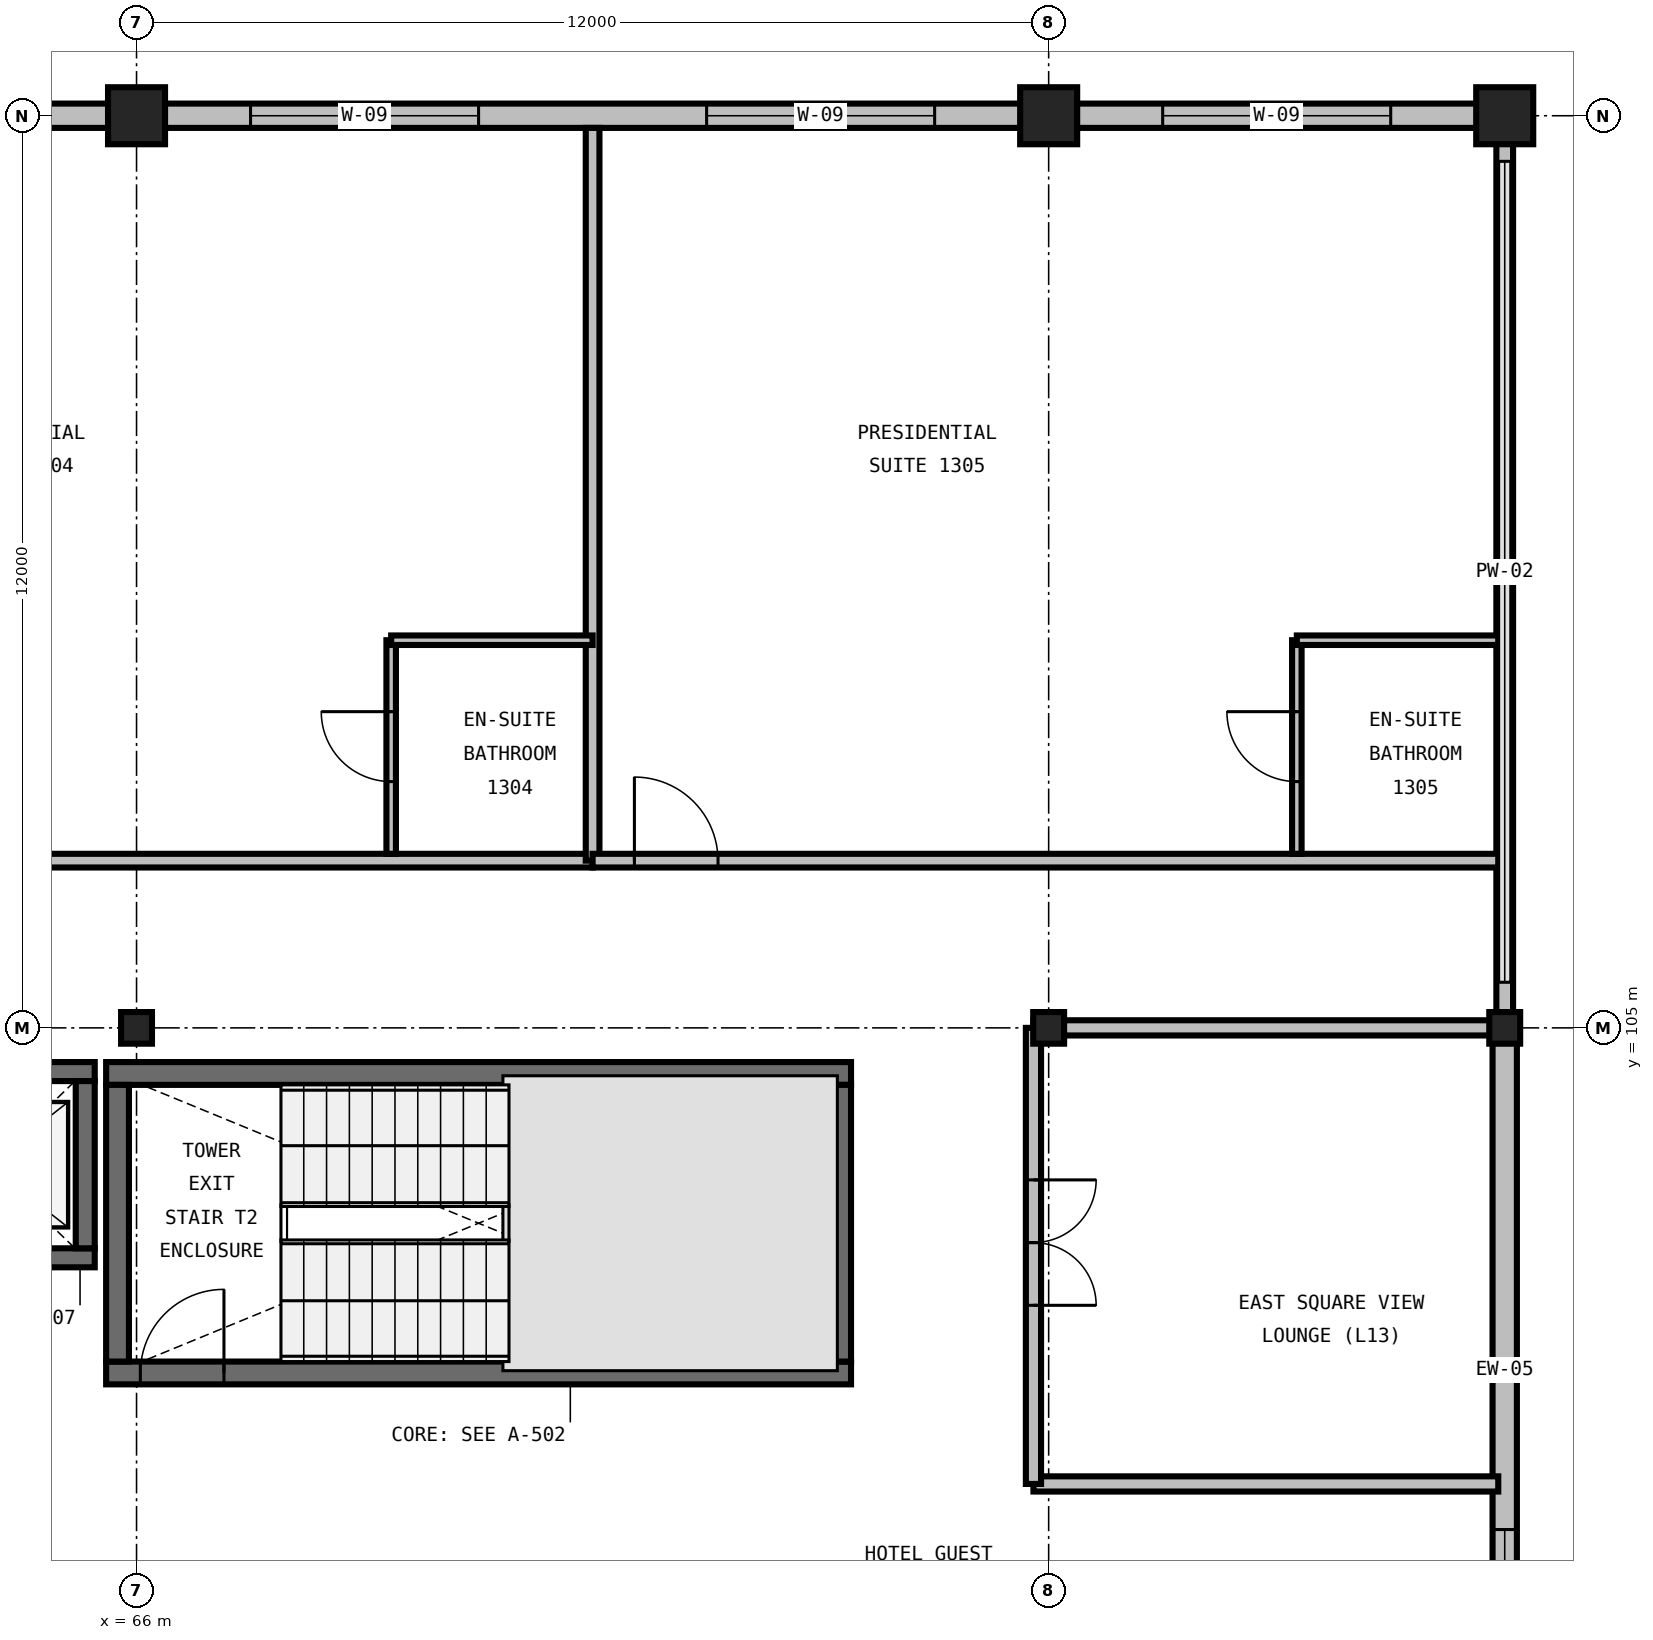
"""IFC4 building model, lengths in metres.
Left out: names, types, materials, properties, quantities, classifications, styles, units other than length and angle.
Written with IfcOpenShell. Run it as: python <this file> out.ifc"""

import sys

from ifc_helpers import new_model, si_unit, direction, frame, frame_2d, origin, origin_2d, place, context, subcontext, project, spatial, rectangle, i_section, extrude, element, fill, save


model = new_model("IFC4")
c1 = context("Model", 3, precision=1e-05, world=origin(), true_north=direction((0.0, 1.0)))
c2 = subcontext(c1, "Body", "Model", "MODEL_VIEW")
j1 = project(units=[si_unit("LENGTHUNIT", "METRE"), si_unit("PLANEANGLEUNIT", "RADIAN")], contexts=[c1])
p1 = place(None, origin())
s1 = spatial("IfcSite", under=j1, at=p1, CompositionType="ELEMENT")
p2 = place(p1, origin())
s2 = spatial("IfcBuilding", under=s1, at=p2, CompositionType="ELEMENT")
p3 = place(p2, frame((0.0, 0.0, 56.4)))
s3 = spatial("IfcBuildingStorey", under=s2, at=p3, CompositionType="ELEMENT", Elevation=56.4)
p4 = place(p3, frame((66.0, 105.0, 0.0), z_axis=(0.0, 0.0, 1.0), x_axis=(1.0, 0.0, 0.0)))
e1 = element("IfcColumn", 1, at=p4, inside=s3, PredefinedType="COLUMN", context=c2, shape_type="SweptSolid", body=[
    extrude(i_section(OverallWidth=0.406, OverallDepth=0.416, WebThickness=0.03, FlangeThickness=0.048, FilletRadius=0.031, at=origin_2d()), origin(), (0.0, 0.0, 1.0), 3.6),
])
p5 = place(p3, frame((66.0, 117.0, 0.0), z_axis=(0.0, 0.0, 1.0), x_axis=(1.0, 0.0, 0.0)))
e2 = element("IfcColumn", 2, at=p5, inside=s3, PredefinedType="COLUMN", context=c2, shape_type="SweptSolid", body=[
    extrude(rectangle(XDim=0.75, YDim=0.75, at=origin_2d()), origin(), (0.0, 0.0, 1.0), 3.6),
])
p6 = place(p3, frame((78.0, 105.0, 0.0), z_axis=(0.0, 0.0, 1.0), x_axis=(1.0, 0.0, 0.0)))
e3 = element("IfcColumn", 3, at=p6, inside=s3, PredefinedType="COLUMN", context=c2, shape_type="SweptSolid", body=[
    extrude(i_section(OverallWidth=0.406, OverallDepth=0.416, WebThickness=0.03, FlangeThickness=0.048, FilletRadius=0.031, at=origin_2d()), origin(), (0.0, 0.0, 1.0), 3.6),
])
p7 = place(p3, frame((78.0, 117.0, 0.0), z_axis=(0.0, 0.0, 1.0), x_axis=(1.0, 0.0, 0.0)))
e4 = element("IfcColumn", 4, at=p7, inside=s3, PredefinedType="COLUMN", context=c2, shape_type="SweptSolid", body=[
    extrude(rectangle(XDim=0.75, YDim=0.75, at=origin_2d()), origin(), (0.0, 0.0, 1.0), 3.6),
])
p8 = place(p3, frame((84.0, 105.0, 0.0), z_axis=(0.0, 0.0, 1.0), x_axis=(1.0, 0.0, 0.0)))
e5 = element("IfcColumn", 5, at=p8, inside=s3, PredefinedType="COLUMN", context=c2, shape_type="SweptSolid", body=[
    extrude(i_section(OverallWidth=0.406, OverallDepth=0.416, WebThickness=0.03, FlangeThickness=0.048, FilletRadius=0.031, at=origin_2d()), origin(), (0.0, 0.0, 1.0), 3.6),
])
p9 = place(p3, frame((84.0, 117.0, 0.0), z_axis=(0.0, 0.0, 1.0), x_axis=(1.0, 0.0, 0.0)))
e6 = element("IfcColumn", 6, at=p9, inside=s3, PredefinedType="COLUMN", context=c2, shape_type="SweptSolid", body=[
    extrude(rectangle(XDim=0.75, YDim=0.75, at=origin_2d()), origin(), (0.0, 0.0, 1.0), 3.6),
])
p10 = place(p3, frame((65.6, 100.46, 0.0), z_axis=(0.0, 0.0, 1.0), x_axis=(1.0, 0.0, 0.0)))
e7 = element("IfcWall", 7, at=p10, inside=s3, PredefinedType="SHEAR", context=c2, shape_type="SweptSolid", body=[
    extrude(rectangle(XDim=9.8, YDim=0.3, at=frame_2d((4.9, 0.0))), origin(), (0.0, 0.0, 1.0), 3.6),
])
p11 = place(p10, frame((0.45, 0.0, 0.0)))
e8 = element("IfcOpeningElement", 8, at=p11, cuts=e7, PredefinedType="OPENING", context=c2, shape_type="SweptSolid", body=[
    extrude(rectangle(XDim=1.1, YDim=2.2, at=frame_2d((0.55, 1.1))), frame((0.0, 0.165, 0.0), z_axis=(0.0, -1.0, 0.0), x_axis=(1.0, 0.0, 0.0)), (0.0, 0.0, 1.0), 0.33),
])
p12 = place(p3, frame((75.4, 104.4, 0.0), z_axis=(0.0, 0.0, 1.0), x_axis=(-1.0, 0.0, 0.0)))
e9 = element("IfcWall", 9, at=p12, inside=s3, PredefinedType="SHEAR", context=c2, shape_type="SweptSolid", body=[
    extrude(rectangle(XDim=9.8, YDim=0.3, at=frame_2d((4.9, 0.0))), origin(), (0.0, 0.0, 1.0), 3.6),
])
for number, where, z_axis, x_axis in (
    (10, (65.75, 104.25, 0.0), (0.0, 0.0, 1.0), (0.0, -1.0, 0.0)),
    (11, (75.25, 100.61, 0.0), (0.0, 0.0, 1.0), (0.0, 1.0, 0.0)),
):
    element("IfcWall", number, at=place(p3, frame(where, z_axis=z_axis, x_axis=x_axis)), inside=s3, PredefinedType="SHEAR", context=c2, shape_type="SweptSolid", body=[
        extrude(rectangle(XDim=3.64, YDim=0.3, at=frame_2d((1.82, 0.0))), origin(), (0.0, 0.0, 1.0), 3.6),
    ])
p13 = place(p3, frame((62.65, 101.975, 0.0), z_axis=(0.0, 0.0, 1.0), x_axis=(1.0, 0.0, 0.0)))
e12 = element("IfcWall", 12, at=p13, inside=s3, PredefinedType="SHEAR", context=c2, shape_type="SweptSolid", body=[
    extrude(rectangle(XDim=2.8, YDim=0.25, at=frame_2d((1.4, 0.0))), origin(), (0.0, 0.0, 1.0), 3.6),
])
p14 = place(p13, frame((0.8, 0.0, 0.0)))
e13 = element("IfcOpeningElement", 13, at=p14, cuts=e12, PredefinedType="OPENING", context=c2, shape_type="SweptSolid", body=[
    extrude(rectangle(XDim=1.2, YDim=2.2, at=frame_2d((0.6, 1.1))), frame((0.0, 0.14, 0.0), z_axis=(0.0, -1.0, 0.0), x_axis=(1.0, 0.0, 0.0)), (0.0, 0.0, 1.0), 0.28),
])
p15 = place(p3, frame((65.45, 104.425, 0.0), z_axis=(0.0, 0.0, 1.0), x_axis=(-1.0, 0.0, 0.0)))
e14 = element("IfcWall", 14, at=p15, inside=s3, PredefinedType="SHEAR", context=c2, shape_type="SweptSolid", body=[
    extrude(rectangle(XDim=2.8, YDim=0.25, at=frame_2d((1.4, 0.0))), origin(), (0.0, 0.0, 1.0), 3.6),
])
p16 = place(p3, frame((65.325, 102.1, 0.0), z_axis=(0.0, 0.0, 1.0), x_axis=(0.0, 1.0, 0.0)))
e15 = element("IfcWall", 15, at=p16, inside=s3, PredefinedType="SHEAR", context=c2, shape_type="SweptSolid", body=[
    extrude(rectangle(XDim=2.2, YDim=0.25, at=frame_2d((1.1, 0.0))), origin(), (0.0, 0.0, 1.0), 3.6),
])
p17 = place(p3, frame((66.0, 117.0, 0.0), z_axis=(0.0, 0.0, 1.0), x_axis=(-1.0, 0.0, 0.0)))
e16 = element("IfcWall", 16, at=p17, inside=s3, PredefinedType="STANDARD", context=c2, shape_type="SweptSolid", body=[
    extrude(rectangle(XDim=12.0, YDim=0.32, at=frame_2d((6.0, 0.0))), origin(), (0.0, 0.0, 1.0), 2.536),
])
p18 = place(p17, frame((1.5, 0.0, 0.7)))
e17 = element("IfcOpeningElement", 17, at=p18, cuts=e16, PredefinedType="OPENING", context=c2, shape_type="SweptSolid", body=[
    extrude(rectangle(XDim=3.0, YDim=1.71, at=frame_2d((1.5, 0.855))), frame((0.0, 0.175, 0.0), z_axis=(0.0, -1.0, 0.0), x_axis=(1.0, 0.0, 0.0)), (0.0, 0.0, 1.0), 0.35),
])
p19 = place(p17, frame((7.5, 0.0, 0.7)))
e18 = element("IfcOpeningElement", 18, at=p19, cuts=e16, PredefinedType="OPENING", context=c2, shape_type="SweptSolid", body=[
    extrude(rectangle(XDim=3.0, YDim=1.71, at=frame_2d((1.5, 0.855))), frame((0.0, 0.175, 0.0), z_axis=(0.0, -1.0, 0.0), x_axis=(1.0, 0.0, 0.0)), (0.0, 0.0, 1.0), 0.35),
])
p20 = place(p3, frame((78.0, 117.0, 0.0), z_axis=(0.0, 0.0, 1.0), x_axis=(-1.0, 0.0, 0.0)))
e19 = element("IfcWall", 19, at=p20, inside=s3, PredefinedType="STANDARD", context=c2, shape_type="SweptSolid", body=[
    extrude(rectangle(XDim=12.0, YDim=0.32, at=frame_2d((6.0, 0.0))), origin(), (0.0, 0.0, 1.0), 2.536),
])
p21 = place(p20, frame((1.5, 0.0, 0.7)))
e20 = element("IfcOpeningElement", 20, at=p21, cuts=e19, PredefinedType="OPENING", context=c2, shape_type="SweptSolid", body=[
    extrude(rectangle(XDim=3.0, YDim=1.71, at=frame_2d((1.5, 0.855))), frame((0.0, 0.175, 0.0), z_axis=(0.0, -1.0, 0.0), x_axis=(1.0, 0.0, 0.0)), (0.0, 0.0, 1.0), 0.35),
])
p22 = place(p20, frame((7.5, 0.0, 0.7)))
e21 = element("IfcOpeningElement", 21, at=p22, cuts=e19, PredefinedType="OPENING", context=c2, shape_type="SweptSolid", body=[
    extrude(rectangle(XDim=3.0, YDim=1.71, at=frame_2d((1.5, 0.855))), frame((0.0, 0.175, 0.0), z_axis=(0.0, -1.0, 0.0), x_axis=(1.0, 0.0, 0.0)), (0.0, 0.0, 1.0), 0.35),
])
p23 = place(p3, frame((84.0, 117.0, 0.0), z_axis=(0.0, 0.0, 1.0), x_axis=(-1.0, 0.0, 0.0)))
e22 = element("IfcWall", 22, at=p23, inside=s3, PredefinedType="STANDARD", context=c2, shape_type="SweptSolid", body=[
    extrude(rectangle(XDim=6.0, YDim=0.32, at=frame_2d((3.0, 0.0))), origin(), (0.0, 0.0, 1.0), 2.536),
])
p24 = place(p23, frame((1.5, 0.0, 0.7)))
e23 = element("IfcOpeningElement", 23, at=p24, cuts=e22, PredefinedType="OPENING", context=c2, shape_type="SweptSolid", body=[
    extrude(rectangle(XDim=3.0, YDim=1.71, at=frame_2d((1.5, 0.855))), frame((0.0, 0.175, 0.0), z_axis=(0.0, -1.0, 0.0), x_axis=(1.0, 0.0, 0.0)), (0.0, 0.0, 1.0), 0.35),
])
p25 = place(p3, frame((84.0, 96.0, 0.0), z_axis=(0.0, 0.0, 1.0), x_axis=(0.0, 1.0, 0.0)))
e24 = element("IfcWall", 24, at=p25, inside=s3, PredefinedType="STANDARD", context=c2, shape_type="SweptSolid", body=[
    extrude(rectangle(XDim=9.0, YDim=0.32, at=frame_2d((4.5, 0.0))), origin(), (0.0, 0.0, 1.0), 2.981),
])
p26 = place(p25, frame((0.6, 0.0, 0.85)))
e25 = element("IfcOpeningElement", 25, at=p26, cuts=e24, PredefinedType="OPENING", context=c2, shape_type="SweptSolid", body=[
    extrude(rectangle(XDim=1.8, YDim=1.5, at=frame_2d((0.9, 0.75))), frame((0.0, 0.175, 0.0), z_axis=(0.0, -1.0, 0.0), x_axis=(1.0, 0.0, 0.0)), (0.0, 0.0, 1.0), 0.35),
])
p27 = place(p3, frame((84.0, 105.0, 0.0), z_axis=(0.0, 0.0, 1.0), x_axis=(0.0, 1.0, 0.0)))
e26 = element("IfcWall", 26, at=p27, inside=s3, PredefinedType="PARAPET", context=c2, shape_type="SweptSolid", body=[
    extrude(rectangle(XDim=12.0, YDim=0.22, at=frame_2d((6.0, 0.0))), origin(), (0.0, 0.0, 1.0), 0.2),
])
p28 = place(p3, frame((60.0, 107.2, 0.0), z_axis=(0.0, 0.0, 1.0), x_axis=(1.0, 0.0, 0.0)))
e27 = element("IfcWall", 27, at=p28, inside=s3, PredefinedType="PARTITIONING", context=c2, shape_type="SweptSolid", body=[
    extrude(rectangle(XDim=12.0, YDim=0.18, at=frame_2d((6.0, 0.0))), origin(), (0.0, 0.0, 1.0), 3.29),
])
p29 = place(p28, frame((0.55, 0.0, 0.0)))
e28 = element("IfcOpeningElement", 28, at=p29, cuts=e27, PredefinedType="OPENING", context=c2, shape_type="SweptSolid", body=[
    extrude(rectangle(XDim=1.1, YDim=2.2, at=frame_2d((0.55, 1.1))), frame((0.0, 0.105, 0.0), z_axis=(0.0, -1.0, 0.0), x_axis=(1.0, 0.0, 0.0)), (0.0, 0.0, 1.0), 0.21),
])
p30 = place(p3, frame((72.0, 107.2, 0.0), z_axis=(0.0, 0.0, 1.0), x_axis=(0.0, 1.0, 0.0)))
e29 = element("IfcWall", 29, at=p30, inside=s3, PredefinedType="PARTITIONING", context=c2, shape_type="SweptSolid", body=[
    extrude(rectangle(XDim=9.64, YDim=0.18, at=frame_2d((4.82, 0.0))), origin(), (0.0, 0.0, 1.0), 3.29),
])
p31 = place(p3, frame((69.35, 107.29, 0.0), z_axis=(0.0, 0.0, 1.0), x_axis=(0.0, 1.0, 0.0)))
e30 = element("IfcWall", 30, at=p31, inside=s3, PredefinedType="PARTITIONING", context=c2, shape_type="SweptSolid", body=[
    extrude(rectangle(XDim=2.81, YDim=0.125, at=frame_2d((1.405, 0.0))), origin(), (0.0, 0.0, 1.0), 3.29),
])
p32 = place(p31, frame((0.95, 0.0, 0.0)))
e31 = element("IfcOpeningElement", 31, at=p32, cuts=e30, PredefinedType="OPENING", context=c2, shape_type="SweptSolid", body=[
    extrude(rectangle(XDim=0.92, YDim=2.1, at=frame_2d((0.46, 1.05))), frame((0.0, 0.077, 0.0), z_axis=(0.0, -1.0, 0.0), x_axis=(1.0, 0.0, 0.0)), (0.0, 0.0, 1.0), 0.155),
])
p33 = place(p3, frame((69.35, 110.1, 0.0), z_axis=(0.0, 0.0, 1.0), x_axis=(1.0, 0.0, 0.0)))
e32 = element("IfcWall", 32, at=p33, inside=s3, PredefinedType="PARTITIONING", context=c2, shape_type="SweptSolid", body=[
    extrude(rectangle(XDim=2.65, YDim=0.125, at=frame_2d((1.325, 0.0))), origin(), (0.0, 0.0, 1.0), 3.29),
])
p34 = place(p3, frame((72.0, 107.2, 0.0), z_axis=(0.0, 0.0, 1.0), x_axis=(1.0, 0.0, 0.0)))
e33 = element("IfcWall", 33, at=p34, inside=s3, PredefinedType="PARTITIONING", context=c2, shape_type="SweptSolid", body=[
    extrude(rectangle(XDim=11.915, YDim=0.18, at=frame_2d((5.957, 0.0))), origin(), (0.0, 0.0, 1.0), 3.29),
])
p35 = place(p34, frame((0.55, 0.0, 0.0)))
e34 = element("IfcOpeningElement", 34, at=p35, cuts=e33, PredefinedType="OPENING", context=c2, shape_type="SweptSolid", body=[
    extrude(rectangle(XDim=1.1, YDim=2.2, at=frame_2d((0.55, 1.1))), frame((0.0, 0.105, 0.0), z_axis=(0.0, -1.0, 0.0), x_axis=(1.0, 0.0, 0.0)), (0.0, 0.0, 1.0), 0.21),
])
p36 = place(p3, frame((81.265, 107.29, 0.0), z_axis=(0.0, 0.0, 1.0), x_axis=(0.0, 1.0, 0.0)))
e35 = element("IfcWall", 35, at=p36, inside=s3, PredefinedType="PARTITIONING", context=c2, shape_type="SweptSolid", body=[
    extrude(rectangle(XDim=2.81, YDim=0.125, at=frame_2d((1.405, 0.0))), origin(), (0.0, 0.0, 1.0), 3.29),
])
p37 = place(p36, frame((0.95, 0.0, 0.0)))
e36 = element("IfcOpeningElement", 36, at=p37, cuts=e35, PredefinedType="OPENING", context=c2, shape_type="SweptSolid", body=[
    extrude(rectangle(XDim=0.92, YDim=2.1, at=frame_2d((0.46, 1.05))), frame((0.0, 0.077, 0.0), z_axis=(0.0, -1.0, 0.0), x_axis=(1.0, 0.0, 0.0)), (0.0, 0.0, 1.0), 0.155),
])
p38 = place(p3, frame((81.265, 110.1, 0.0), z_axis=(0.0, 0.0, 1.0), x_axis=(1.0, 0.0, 0.0)))
e37 = element("IfcWall", 37, at=p38, inside=s3, PredefinedType="PARTITIONING", context=c2, shape_type="SweptSolid", body=[
    extrude(rectangle(XDim=2.65, YDim=0.125, at=frame_2d((1.325, 0.0))), origin(), (0.0, 0.0, 1.0), 3.29),
])
p39 = place(p3, frame((77.8, 99.0, 0.0), z_axis=(0.0, 0.0, 1.0), x_axis=(1.0, 0.0, 0.0)))
e38 = element("IfcWall", 38, at=p39, inside=s3, PredefinedType="PARTITIONING", context=c2, shape_type="SweptSolid", body=[
    extrude(rectangle(XDim=6.115, YDim=0.2, at=frame_2d((3.057, 0.0))), origin(), (0.0, 0.0, 1.0), 3.29),
])
p40 = place(p3, frame((83.915, 105.0, 0.0), z_axis=(0.0, 0.0, 1.0), x_axis=(-1.0, 0.0, 0.0)))
e39 = element("IfcWall", 39, at=p40, inside=s3, PredefinedType="PARTITIONING", context=c2, shape_type="SweptSolid", body=[
    extrude(rectangle(XDim=6.115, YDim=0.2, at=frame_2d((3.057, 0.0))), origin(), (0.0, 0.0, 1.0), 2.736),
])
p41 = place(p3, frame((77.8, 105.0, 0.0), z_axis=(0.0, 0.0, 1.0), x_axis=(0.0, -1.0, 0.0)))
e40 = element("IfcWall", 40, at=p41, inside=s3, PredefinedType="PARTITIONING", context=c2, shape_type="SweptSolid", body=[
    extrude(rectangle(XDim=6.0, YDim=0.2, at=frame_2d((3.0, 0.0))), origin(), (0.0, 0.0, 1.0), 3.29),
])
p42 = place(p41, frame((2.0, 0.0, 0.0)))
e41 = element("IfcOpeningElement", 41, at=p42, cuts=e40, PredefinedType="OPENING", context=c2, shape_type="SweptSolid", body=[
    extrude(rectangle(XDim=1.65, YDim=2.25, at=frame_2d((0.825, 1.125))), frame((0.0, 0.115, 0.0), z_axis=(0.0, -1.0, 0.0), x_axis=(1.0, 0.0, 0.0)), (0.0, 0.0, 1.0), 0.23),
])
p43 = place(p11, origin())
e42 = element("IfcDoor", 42, at=p43, inside=s3, OperationType="SINGLE_SWING_RIGHT", PredefinedType="DOOR", context=c2, shape_type="SweptSolid", body=[
    extrude(rectangle(XDim=1.1, YDim=2.2, at=frame_2d((0.55, 1.1))), frame((0.0, 0.025, 0.0), z_axis=(0.0, -1.0, 0.0), x_axis=(1.0, 0.0, 0.0)), (0.0, 0.0, 1.0), 0.05),
])
fill(e8, e42)
p44 = place(p21, origin())
e43 = element("IfcWindow", 43, at=p44, inside=s3, PartitioningType="TRIPLE_PANEL_VERTICAL", PredefinedType="WINDOW", context=c2, shape_type="SweptSolid", body=[
    extrude(rectangle(XDim=3.0, YDim=1.71, at=frame_2d((1.5, 0.855))), frame((0.0, 0.03, 0.0), z_axis=(0.0, -1.0, 0.0), x_axis=(1.0, 0.0, 0.0)), (0.0, 0.0, 1.0), 0.06),
])
fill(e20, e43)
p45 = place(p22, origin())
e44 = element("IfcWindow", 44, at=p45, inside=s3, PartitioningType="TRIPLE_PANEL_VERTICAL", PredefinedType="WINDOW", context=c2, shape_type="SweptSolid", body=[
    extrude(rectangle(XDim=3.0, YDim=1.71, at=frame_2d((1.5, 0.855))), frame((0.0, 0.03, 0.0), z_axis=(0.0, -1.0, 0.0), x_axis=(1.0, 0.0, 0.0)), (0.0, 0.0, 1.0), 0.06),
])
fill(e21, e44)
p46 = place(p24, origin())
e45 = element("IfcWindow", 45, at=p46, inside=s3, PartitioningType="TRIPLE_PANEL_VERTICAL", PredefinedType="WINDOW", context=c2, shape_type="SweptSolid", body=[
    extrude(rectangle(XDim=3.0, YDim=1.71, at=frame_2d((1.5, 0.855))), frame((0.0, 0.03, 0.0), z_axis=(0.0, -1.0, 0.0), x_axis=(1.0, 0.0, 0.0)), (0.0, 0.0, 1.0), 0.06),
])
fill(e23, e45)
p47 = place(p26, origin())
e46 = element("IfcWindow", 46, at=p47, inside=s3, PartitioningType="SINGLE_PANEL", PredefinedType="WINDOW", context=c2, shape_type="SweptSolid", body=[
    extrude(rectangle(XDim=1.8, YDim=1.5, at=frame_2d((0.9, 0.75))), frame((0.0, 0.03, 0.0), z_axis=(0.0, -1.0, 0.0), x_axis=(1.0, 0.0, 0.0)), (0.0, 0.0, 1.0), 0.06),
])
fill(e25, e46)
p48 = place(p32, origin())
e47 = element("IfcDoor", 47, at=p48, inside=s3, OperationType="SINGLE_SWING_RIGHT", PredefinedType="DOOR", context=c2, shape_type="SweptSolid", body=[
    extrude(rectangle(XDim=0.92, YDim=2.1, at=frame_2d((0.46, 1.05))), frame((0.0, 0.025, 0.0), z_axis=(0.0, -1.0, 0.0), x_axis=(1.0, 0.0, 0.0)), (0.0, 0.0, 1.0), 0.05),
])
fill(e31, e47)
p49 = place(p35, origin())
e48 = element("IfcDoor", 48, at=p49, inside=s3, OperationType="SINGLE_SWING_LEFT", PredefinedType="DOOR", context=c2, shape_type="SweptSolid", body=[
    extrude(rectangle(XDim=1.1, YDim=2.2, at=frame_2d((0.55, 1.1))), frame((0.0, 0.025, 0.0), z_axis=(0.0, -1.0, 0.0), x_axis=(1.0, 0.0, 0.0)), (0.0, 0.0, 1.0), 0.05),
])
fill(e34, e48)
p50 = place(p37, origin())
e49 = element("IfcDoor", 49, at=p50, inside=s3, OperationType="SINGLE_SWING_RIGHT", PredefinedType="DOOR", context=c2, shape_type="SweptSolid", body=[
    extrude(rectangle(XDim=0.92, YDim=2.1, at=frame_2d((0.46, 1.05))), frame((0.0, 0.025, 0.0), z_axis=(0.0, -1.0, 0.0), x_axis=(1.0, 0.0, 0.0)), (0.0, 0.0, 1.0), 0.05),
])
fill(e36, e49)
p51 = place(p42, origin())
e50 = element("IfcDoor", 50, at=p51, inside=s3, OperationType="DOUBLE_DOOR_SINGLE_SWING", PredefinedType="DOOR", context=c2, shape_type="SweptSolid", body=[
    extrude(rectangle(XDim=1.65, YDim=2.25, at=frame_2d((0.825, 1.125))), frame((0.0, 0.025, 0.0), z_axis=(0.0, -1.0, 0.0), x_axis=(1.0, 0.0, 0.0)), (0.0, 0.0, 1.0), 0.05),
])
fill(e41, e50)
save(model, sys.argv[1])
